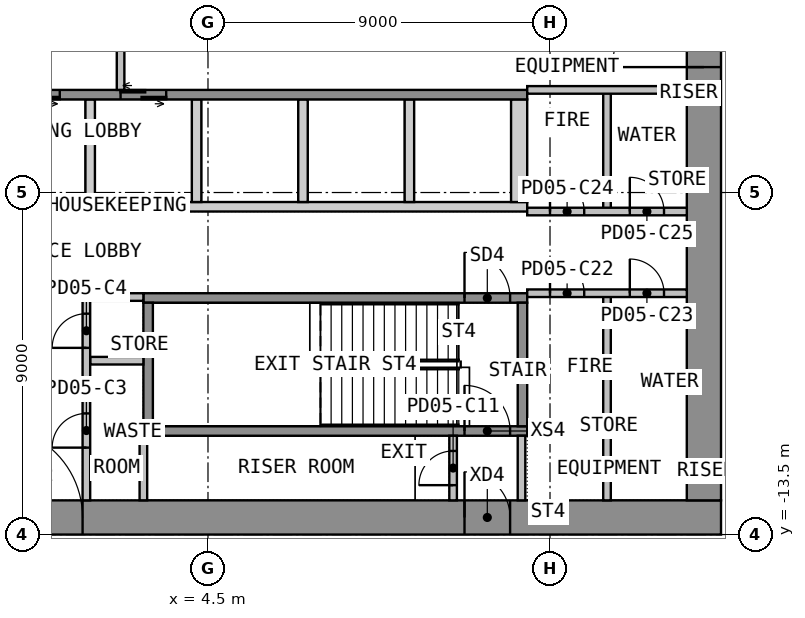
"""IFC4 building model, lengths in metres.
Left out: names, types, materials, properties, quantities, classifications, styles, units other than length and angle.
Written with IfcOpenShell. Run it as: python <this file> out.ifc"""

import sys

from ifc_helpers import new_model, si_unit, direction, frame, frame_2d, origin, place, context, subcontext, project, spatial, polyline, rectangle, outline, extrude, element, fill, save


model = new_model("IFC4")
c1 = context("Model", 3, precision=1e-05, world=origin(), true_north=direction((0.0, 1.0)))
c2 = subcontext(c1, "Body", "Model", "MODEL_VIEW")
j1 = project(units=[si_unit("LENGTHUNIT", "METRE"), si_unit("PLANEANGLEUNIT", "RADIAN")], contexts=[c1])
p1 = place(None, origin())
s1 = spatial("IfcSite", under=j1, at=p1, CompositionType="ELEMENT")
p2 = place(p1, origin())
s2 = spatial("IfcBuilding", under=s1, at=p2, CompositionType="ELEMENT")
p3 = place(p2, frame((0.0, 0.0, 25.2)))
s3 = spatial("IfcBuildingStorey", under=s2, at=p3, CompositionType="ELEMENT", Elevation=25.2)
p4 = place(p3, frame((-18.0, -13.05, 0.0), z_axis=(0.0, 0.0, 1.0), x_axis=(1.0, 0.0, 0.0)))
e1 = element("IfcWall", 1, at=p4, inside=s3, PredefinedType="SHEAR", context=c2, shape_type="SweptSolid", body=[
    extrude(rectangle(XDim=36.0, YDim=0.9, at=frame_2d((18.0, 0.0))), origin(), (0.0, 0.0, 1.0), 4.425),
])
p5 = place(p4, frame((16.8, 0.0, 0.0)))
e2 = element("IfcOpeningElement", 2, at=p5, cuts=e1, PredefinedType="OPENING", context=c2, shape_type="SweptSolid", body=[
    extrude(rectangle(XDim=2.4, YDim=2.1, at=frame_2d((1.2, 1.05))), frame((0.0, 0.46, 0.0), z_axis=(0.0, -1.0, 0.0), x_axis=(1.0, 0.0, 0.0)), (0.0, 0.0, 1.0), 0.92),
])
p6 = place(p4, frame((5.55, 0.0, 0.0)))
e3 = element("IfcOpeningElement", 3, at=p6, cuts=e1, PredefinedType="OPENING", context=c2, shape_type="SweptSolid", body=[
    extrude(rectangle(XDim=1.2, YDim=2.1, at=frame_2d((0.6, 1.05))), frame((0.0, 0.46, 0.0), z_axis=(0.0, -1.0, 0.0), x_axis=(1.0, 0.0, 0.0)), (0.0, 0.0, 1.0), 0.92),
])
p7 = place(p4, frame((29.25, 0.0, 0.0)))
e4 = element("IfcOpeningElement", 4, at=p7, cuts=e1, PredefinedType="OPENING", context=c2, shape_type="SweptSolid", body=[
    extrude(rectangle(XDim=1.2, YDim=2.1, at=frame_2d((0.6, 1.05))), frame((0.0, 0.46, 0.0), z_axis=(0.0, -1.0, 0.0), x_axis=(1.0, 0.0, 0.0)), (0.0, 0.0, 1.0), 0.92),
])
p8 = place(p3, frame((17.55, -12.6, 0.0), z_axis=(0.0, 0.0, 1.0), x_axis=(0.0, 1.0, 0.0)))
e5 = element("IfcWall", 5, at=p8, inside=s3, PredefinedType="SHEAR", context=c2, shape_type="SweptSolid", body=[
    extrude(rectangle(XDim=25.2, YDim=0.9, at=frame_2d((12.6, 0.0))), origin(), (0.0, 0.0, 1.0), 4.425),
])
p9 = place(p8, frame((11.4, 0.0, 0.0)))
e6 = element("IfcOpeningElement", 6, at=p9, cuts=e5, PredefinedType="OPENING", context=c2, shape_type="SweptSolid", body=[
    extrude(rectangle(XDim=2.4, YDim=2.1, at=frame_2d((1.2, 1.05))), frame((0.0, 0.46, 0.0), z_axis=(0.0, -1.0, 0.0), x_axis=(1.0, 0.0, 0.0)), (0.0, 0.0, 1.0), 0.92),
])
p10 = place(p3, origin())
e7 = element("IfcWall", 7, at=p10, inside=s3, PredefinedType="SHEAR", context=c2, shape_type="SweptSolid", body=[
    extrude(outline(polyline([(-12.9, -5.0), (12.9, -5.0), (12.9, -4.75), (-12.9, -4.75), (-12.9, -5.0)])), origin(), (0.0, 0.0, 1.0), 4.425),
])
p11 = place(p3, origin())
e8 = element("IfcWall", 8, at=p11, inside=s3, PredefinedType="SHEAR", context=c2, shape_type="SweptSolid", body=[
    extrude(outline(polyline([(1.275, -4.75), (1.525, -4.75), (1.525, -2.05), (1.275, -2.05), (1.275, -4.75)])), origin(), (0.0, 0.0, 1.0), 4.425),
])
p12 = place(p3, origin())
e9 = element("IfcWall", 9, at=p12, inside=s3, PredefinedType="SHEAR", context=c2, shape_type="SweptSolid", body=[
    extrude(outline(polyline([(4.075, -4.75), (4.325, -4.75), (4.325, -2.05), (4.075, -2.05), (4.075, -4.75)])), origin(), (0.0, 0.0, 1.0), 4.425),
])
p13 = place(p3, origin())
e10 = element("IfcWall", 10, at=p13, inside=s3, PredefinedType="SHEAR", context=c2, shape_type="SweptSolid", body=[
    extrude(outline(polyline([(6.875, -4.75), (7.125, -4.75), (7.125, -2.05), (6.875, -2.05), (6.875, -4.75)])), origin(), (0.0, 0.0, 1.0), 4.425),
])
p14 = place(p3, origin())
e11 = element("IfcWall", 11, at=p14, inside=s3, PredefinedType="SHEAR", context=c2, shape_type="SweptSolid", body=[
    extrude(outline(polyline([(9.675, -4.75), (9.925, -4.75), (9.925, -2.05), (9.675, -2.05), (9.675, -4.75)])), origin(), (0.0, 0.0, 1.0), 4.425),
])
p15 = place(p3, origin())
e12 = element("IfcWall", 12, at=p15, inside=s3, PredefinedType="SHEAR", context=c2, shape_type="SweptSolid", body=[
    extrude(outline(polyline([(12.475, -4.75), (12.9, -4.75), (12.9, -2.05), (12.475, -2.05), (12.475, -4.75)])), origin(), (0.0, 0.0, 1.0), 4.425),
])
p16 = place(p3, frame((-12.9, -1.925, 0.0), z_axis=(0.0, 0.0, 1.0), x_axis=(1.0, 0.0, 0.0)))
e13 = element("IfcWall", 13, at=p16, inside=s3, PredefinedType="SHEAR", context=c2, shape_type="SweptSolid", body=[
    extrude(rectangle(XDim=25.8, YDim=0.25, at=frame_2d((12.9, 0.0))), origin(), (0.0, 0.0, 1.0), 4.425),
])
p17 = place(p16, frame((1.1, 0.0, 0.0)))
e14 = element("IfcOpeningElement", 14, at=p17, cuts=e13, PredefinedType="OPENING", context=c2, shape_type="SweptSolid", body=[
    extrude(rectangle(XDim=1.2, YDim=2.1, at=frame_2d((0.6, 1.05))), frame((0.0, 0.135, 0.0), z_axis=(0.0, -1.0, 0.0), x_axis=(1.0, 0.0, 0.0)), (0.0, 0.0, 1.0), 0.27),
])
p18 = place(p16, frame((3.9, 0.0, 0.0)))
e15 = element("IfcOpeningElement", 15, at=p18, cuts=e13, PredefinedType="OPENING", context=c2, shape_type="SweptSolid", body=[
    extrude(rectangle(XDim=1.2, YDim=2.1, at=frame_2d((0.6, 1.05))), frame((0.0, 0.135, 0.0), z_axis=(0.0, -1.0, 0.0), x_axis=(1.0, 0.0, 0.0)), (0.0, 0.0, 1.0), 0.27),
])
p19 = place(p16, frame((6.7, 0.0, 0.0)))
e16 = element("IfcOpeningElement", 16, at=p19, cuts=e13, PredefinedType="OPENING", context=c2, shape_type="SweptSolid", body=[
    extrude(rectangle(XDim=1.2, YDim=2.1, at=frame_2d((0.6, 1.05))), frame((0.0, 0.135, 0.0), z_axis=(0.0, -1.0, 0.0), x_axis=(1.0, 0.0, 0.0)), (0.0, 0.0, 1.0), 0.27),
])
p20 = place(p16, frame((9.5, 0.0, 0.0)))
e17 = element("IfcOpeningElement", 17, at=p20, cuts=e13, PredefinedType="OPENING", context=c2, shape_type="SweptSolid", body=[
    extrude(rectangle(XDim=1.2, YDim=2.1, at=frame_2d((0.6, 1.05))), frame((0.0, 0.135, 0.0), z_axis=(0.0, -1.0, 0.0), x_axis=(1.0, 0.0, 0.0)), (0.0, 0.0, 1.0), 0.27),
])
p21 = place(p16, frame((12.3, 0.0, 0.0)))
e18 = element("IfcOpeningElement", 18, at=p21, cuts=e13, PredefinedType="OPENING", context=c2, shape_type="SweptSolid", body=[
    extrude(rectangle(XDim=1.2, YDim=2.1, at=frame_2d((0.6, 1.05))), frame((0.0, 0.135, 0.0), z_axis=(0.0, -1.0, 0.0), x_axis=(1.0, 0.0, 0.0)), (0.0, 0.0, 1.0), 0.27),
])
p22 = place(p16, frame((15.1, 0.0, 0.0)))
e19 = element("IfcOpeningElement", 19, at=p22, cuts=e13, PredefinedType="OPENING", context=c2, shape_type="SweptSolid", body=[
    extrude(rectangle(XDim=1.2, YDim=2.1, at=frame_2d((0.6, 1.05))), frame((0.0, 0.135, 0.0), z_axis=(0.0, -1.0, 0.0), x_axis=(1.0, 0.0, 0.0)), (0.0, 0.0, 1.0), 0.27),
])
p23 = place(p3, frame((2.2, -1.8, 0.0), z_axis=(0.0, 0.0, 1.0), x_axis=(0.0, 1.0, 0.0)))
e20 = element("IfcWall", 20, at=p23, inside=s3, PredefinedType="PARTITIONING", context=c2, shape_type="SweptSolid", body=[
    extrude(rectangle(XDim=3.6, YDim=0.2, at=frame_2d((1.8, 0.0))), origin(), (0.0, 0.0, 1.0), 4.425),
])
p24 = place(p23, frame((1.2, 0.0, 0.0)))
e21 = element("IfcOpeningElement", 21, at=p24, cuts=e20, PredefinedType="OPENING", context=c2, shape_type="SweptSolid", body=[
    extrude(rectangle(XDim=1.2, YDim=2.1, at=frame_2d((0.6, 1.05))), frame((0.0, 0.11, 0.0), z_axis=(0.0, -1.0, 0.0), x_axis=(1.0, 0.0, 0.0)), (0.0, 0.0, 1.0), 0.22),
])
p25 = place(p3, frame((2.8, -10.775, 0.0), z_axis=(0.0, 0.0, 1.0), x_axis=(1.0, 0.0, 0.0)))
e22 = element("IfcWall", 22, at=p25, inside=s3, PredefinedType="SHEAR", context=c2, shape_type="SweptSolid", body=[
    extrude(rectangle(XDim=10.1, YDim=0.25, at=frame_2d((5.05, 0.0))), origin(), (0.0, 0.0, 1.0), 4.425),
])
p26 = place(p25, frame((8.45, 0.0, 0.0)))
e23 = element("IfcOpeningElement", 23, at=p26, cuts=e22, PredefinedType="OPENING", context=c2, shape_type="SweptSolid", body=[
    extrude(rectangle(XDim=1.2, YDim=2.1, at=frame_2d((0.6, 1.05))), frame((0.0, 0.135, 0.0), z_axis=(0.0, -1.0, 0.0), x_axis=(1.0, 0.0, 0.0)), (0.0, 0.0, 1.0), 0.27),
])
p27 = place(p3, frame((2.8, -7.275, 0.0), z_axis=(0.0, 0.0, 1.0), x_axis=(1.0, 0.0, 0.0)))
e24 = element("IfcWall", 24, at=p27, inside=s3, PredefinedType="SHEAR", context=c2, shape_type="SweptSolid", body=[
    extrude(rectangle(XDim=10.1, YDim=0.25, at=frame_2d((5.05, 0.0))), origin(), (0.0, 0.0, 1.0), 4.425),
])
p28 = place(p27, frame((8.45, 0.0, 0.0)))
e25 = element("IfcOpeningElement", 25, at=p28, cuts=e24, PredefinedType="OPENING", context=c2, shape_type="SweptSolid", body=[
    extrude(rectangle(XDim=1.2, YDim=2.1, at=frame_2d((0.6, 1.05))), frame((0.0, 0.135, 0.0), z_axis=(0.0, -1.0, 0.0), x_axis=(1.0, 0.0, 0.0)), (0.0, 0.0, 1.0), 0.27),
])
for number, where, z_axis, x_axis in (
    (26, (2.925, -10.65, 0.0), (0.0, 0.0, 1.0), (0.0, 1.0, 0.0)),
    (27, (12.775, -10.65, 0.0), (0.0, 0.0, 1.0), (0.0, 1.0, 0.0)),
):
    element("IfcWall", number, at=place(p3, frame(where, z_axis=z_axis, x_axis=x_axis)), inside=s3, PredefinedType="SHEAR", context=c2, shape_type="SweptSolid", body=[
        extrude(rectangle(XDim=3.25, YDim=0.25, at=frame_2d((1.625, 0.0))), origin(), (0.0, 0.0, 1.0), 4.425),
    ])
for number, where, z_axis, x_axis in (
    (28, (1.4, -7.25, 0.0), (0.0, 0.0, 1.0), (1.0, 0.0, 0.0)),
    (29, (1.4, -8.925, 0.0), (0.0, 0.0, 1.0), (1.0, 0.0, 0.0)),
):
    element("IfcWall", number, at=place(p3, frame(where, z_axis=z_axis, x_axis=x_axis)), inside=s3, PredefinedType="PARTITIONING", context=c2, shape_type="SweptSolid", body=[
        extrude(rectangle(XDim=1.4, YDim=0.2, at=frame_2d((0.7, 0.0))), origin(), (0.0, 0.0, 1.0), 4.425),
    ])
p29 = place(p3, frame((1.3, -12.6, 0.0), z_axis=(0.0, 0.0, 1.0), x_axis=(0.0, 1.0, 0.0)))
e30 = element("IfcWall", 30, at=p29, inside=s3, PredefinedType="PARTITIONING", context=c2, shape_type="SweptSolid", body=[
    extrude(rectangle(XDim=5.45, YDim=0.2, at=frame_2d((2.725, 0.0))), origin(), (0.0, 0.0, 1.0), 4.425),
])
p30 = place(p29, frame((1.387, 0.0, 0.0)))
e31 = element("IfcOpeningElement", 31, at=p30, cuts=e30, PredefinedType="OPENING", context=c2, shape_type="SweptSolid", body=[
    extrude(rectangle(XDim=0.9, YDim=2.1, at=frame_2d((0.45, 1.05))), frame((0.0, 0.11, 0.0), z_axis=(0.0, -1.0, 0.0), x_axis=(1.0, 0.0, 0.0)), (0.0, 0.0, 1.0), 0.22),
])
p31 = place(p29, frame((4.012, 0.0, 0.0)))
e32 = element("IfcOpeningElement", 32, at=p31, cuts=e30, PredefinedType="OPENING", context=c2, shape_type="SweptSolid", body=[
    extrude(rectangle(XDim=0.9, YDim=2.1, at=frame_2d((0.45, 1.05))), frame((0.0, 0.11, 0.0), z_axis=(0.0, -1.0, 0.0), x_axis=(1.0, 0.0, 0.0)), (0.0, 0.0, 1.0), 0.22),
])
p32 = place(p3, frame((12.75, -12.6, 0.0), z_axis=(0.0, 0.0, 1.0), x_axis=(0.0, 1.0, 0.0)))
e33 = element("IfcWall", 33, at=p32, inside=s3, PredefinedType="PARTITIONING", context=c2, shape_type="SweptSolid", body=[
    extrude(rectangle(XDim=1.7, YDim=0.2, at=frame_2d((0.85, 0.0))), origin(), (0.0, 0.0, 1.0), 4.425),
])
p33 = place(p3, frame((10.95, -12.6, 0.0), z_axis=(0.0, 0.0, 1.0), x_axis=(0.0, 1.0, 0.0)))
e34 = element("IfcWall", 34, at=p33, inside=s3, PredefinedType="PARTITIONING", context=c2, shape_type="SweptSolid", body=[
    extrude(rectangle(XDim=1.7, YDim=0.2, at=frame_2d((0.85, 0.0))), origin(), (0.0, 0.0, 1.0), 4.425),
])
p34 = place(p33, frame((0.4, 0.0, 0.0)))
e35 = element("IfcOpeningElement", 35, at=p34, cuts=e34, PredefinedType="OPENING", context=c2, shape_type="SweptSolid", body=[
    extrude(rectangle(XDim=0.9, YDim=2.1, at=frame_2d((0.45, 1.05))), frame((0.0, 0.11, 0.0), z_axis=(0.0, -1.0, 0.0), x_axis=(1.0, 0.0, 0.0)), (0.0, 0.0, 1.0), 0.22),
])
p35 = place(p3, frame((15.0, -12.6, 0.0), z_axis=(0.0, 0.0, 1.0), x_axis=(0.0, 1.0, 0.0)))
e36 = element("IfcWall", 36, at=p35, inside=s3, PredefinedType="PARTITIONING", context=c2, shape_type="SweptSolid", body=[
    extrude(rectangle(XDim=5.45, YDim=0.2, at=frame_2d((2.725, 0.0))), origin(), (0.0, 0.0, 1.0), 4.425),
])
p36 = place(p3, frame((12.9, -7.15, 0.0), z_axis=(0.0, 0.0, 1.0), x_axis=(1.0, 0.0, 0.0)))
e37 = element("IfcWall", 37, at=p36, inside=s3, PredefinedType="PARTITIONING", context=c2, shape_type="SweptSolid", body=[
    extrude(rectangle(XDim=4.2, YDim=0.2, at=frame_2d((2.1, 0.0))), origin(), (0.0, 0.0, 1.0), 4.425),
])
p37 = place(p36, frame((0.6, 0.0, 0.0)))
e38 = element("IfcOpeningElement", 38, at=p37, cuts=e37, PredefinedType="OPENING", context=c2, shape_type="SweptSolid", body=[
    extrude(rectangle(XDim=0.9, YDim=2.1, at=frame_2d((0.45, 1.05))), frame((0.0, 0.11, 0.0), z_axis=(0.0, -1.0, 0.0), x_axis=(1.0, 0.0, 0.0)), (0.0, 0.0, 1.0), 0.22),
])
p38 = place(p36, frame((2.7, 0.0, 0.0)))
e39 = element("IfcOpeningElement", 39, at=p38, cuts=e37, PredefinedType="OPENING", context=c2, shape_type="SweptSolid", body=[
    extrude(rectangle(XDim=0.9, YDim=2.1, at=frame_2d((0.45, 1.05))), frame((0.0, 0.11, 0.0), z_axis=(0.0, -1.0, 0.0), x_axis=(1.0, 0.0, 0.0)), (0.0, 0.0, 1.0), 0.22),
])
p39 = place(p3, frame((15.0, -5.0, 0.0), z_axis=(0.0, 0.0, 1.0), x_axis=(0.0, 1.0, 0.0)))
e40 = element("IfcWall", 40, at=p39, inside=s3, PredefinedType="PARTITIONING", context=c2, shape_type="SweptSolid", body=[
    extrude(rectangle(XDim=3.2, YDim=0.2, at=frame_2d((1.6, 0.0))), origin(), (0.0, 0.0, 1.0), 4.425),
])
p40 = place(p3, frame((12.9, -5.0, 0.0), z_axis=(0.0, 0.0, 1.0), x_axis=(1.0, 0.0, 0.0)))
e41 = element("IfcWall", 41, at=p40, inside=s3, PredefinedType="PARTITIONING", context=c2, shape_type="SweptSolid", body=[
    extrude(rectangle(XDim=4.2, YDim=0.2, at=frame_2d((2.1, 0.0))), origin(), (0.0, 0.0, 1.0), 4.425),
])
p41 = place(p40, frame((0.6, 0.0, 0.0)))
e42 = element("IfcOpeningElement", 42, at=p41, cuts=e41, PredefinedType="OPENING", context=c2, shape_type="SweptSolid", body=[
    extrude(rectangle(XDim=0.9, YDim=2.1, at=frame_2d((0.45, 1.05))), frame((0.0, 0.11, 0.0), z_axis=(0.0, -1.0, 0.0), x_axis=(1.0, 0.0, 0.0)), (0.0, 0.0, 1.0), 0.22),
])
p42 = place(p40, frame((2.7, 0.0, 0.0)))
e43 = element("IfcOpeningElement", 43, at=p42, cuts=e41, PredefinedType="OPENING", context=c2, shape_type="SweptSolid", body=[
    extrude(rectangle(XDim=0.9, YDim=2.1, at=frame_2d((0.45, 1.05))), frame((0.0, 0.11, 0.0), z_axis=(0.0, -1.0, 0.0), x_axis=(1.0, 0.0, 0.0)), (0.0, 0.0, 1.0), 0.22),
])
p43 = place(p3, frame((12.9, -1.8, 0.0), z_axis=(0.0, 0.0, 1.0), x_axis=(1.0, 0.0, 0.0)))
e44 = element("IfcWall", 44, at=p43, inside=s3, PredefinedType="PARTITIONING", context=c2, shape_type="SweptSolid", body=[
    extrude(rectangle(XDim=4.2, YDim=0.2, at=frame_2d((2.1, 0.0))), origin(), (0.0, 0.0, 1.0), 4.425),
])
p44 = place(p3, frame((2.8, -10.901, 0.0), z_axis=(0.0, 0.0, 1.0), x_axis=(0.0, -1.0, 0.0)))
e45 = element("IfcWall", 45, at=p44, inside=s3, PredefinedType="PARTITIONING", context=c2, shape_type="SweptSolid", body=[
    extrude(rectangle(XDim=1.698, YDim=0.2, at=frame_2d((0.849, 0.0))), origin(), (0.0, 0.0, 1.0), 4.425),
])
p45 = place(p9, origin())
e46 = element("IfcDoor", 46, at=p45, inside=s3, OperationType="DOUBLE_DOOR_DOUBLE_SWING", PredefinedType="DOOR", context=c2, shape_type="SweptSolid", body=[
    extrude(rectangle(XDim=2.4, YDim=2.1, at=frame_2d((1.2, 1.05))), frame((0.0, 0.025, 0.0), z_axis=(0.0, -1.0, 0.0), x_axis=(1.0, 0.0, 0.0)), (0.0, 0.0, 1.0), 0.05),
])
fill(e6, e46)
p46 = place(p5, origin())
e47 = element("IfcDoor", 47, at=p46, inside=s3, OperationType="DOUBLE_DOOR_DOUBLE_SWING", PredefinedType="DOOR", context=c2, shape_type="SweptSolid", body=[
    extrude(rectangle(XDim=2.4, YDim=2.1, at=frame_2d((1.2, 1.05))), frame((0.0, 0.025, 0.0), z_axis=(0.0, -1.0, 0.0), x_axis=(1.0, 0.0, 0.0)), (0.0, 0.0, 1.0), 0.05),
])
fill(e2, e47)
p47 = place(p7, origin())
e48 = element("IfcDoor", 48, at=p47, inside=s3, OperationType="SINGLE_SWING_RIGHT", PredefinedType="DOOR", context=c2, shape_type="SweptSolid", body=[
    extrude(rectangle(XDim=1.2, YDim=2.1, at=frame_2d((0.6, 1.05))), frame((0.0, 0.025, 0.0), z_axis=(0.0, -1.0, 0.0), x_axis=(1.0, 0.0, 0.0)), (0.0, 0.0, 1.0), 0.05),
])
fill(e4, e48)
p48 = place(p21, origin())
e49 = element("IfcDoor", 49, at=p48, inside=s3, OperationType="DOUBLE_DOOR_SLIDING", PredefinedType="DOOR", context=c2, shape_type="SweptSolid", body=[
    extrude(rectangle(XDim=1.2, YDim=2.1, at=frame_2d((0.6, 1.05))), frame((0.0, 0.025, 0.0), z_axis=(0.0, -1.0, 0.0), x_axis=(1.0, 0.0, 0.0)), (0.0, 0.0, 1.0), 0.05),
])
fill(e18, e49)
p49 = place(p22, origin())
e50 = element("IfcDoor", 50, at=p49, inside=s3, OperationType="DOUBLE_DOOR_SLIDING", PredefinedType="DOOR", context=c2, shape_type="SweptSolid", body=[
    extrude(rectangle(XDim=1.2, YDim=2.1, at=frame_2d((0.6, 1.05))), frame((0.0, 0.025, 0.0), z_axis=(0.0, -1.0, 0.0), x_axis=(1.0, 0.0, 0.0)), (0.0, 0.0, 1.0), 0.05),
])
fill(e19, e50)
p50 = place(p28, origin())
e51 = element("IfcDoor", 51, at=p50, inside=s3, OperationType="SINGLE_SWING_LEFT", PredefinedType="DOOR", context=c2, shape_type="SweptSolid", body=[
    extrude(rectangle(XDim=1.2, YDim=2.1, at=frame_2d((0.6, 1.05))), frame((0.0, 0.025, 0.0), z_axis=(0.0, -1.0, 0.0), x_axis=(1.0, 0.0, 0.0)), (0.0, 0.0, 1.0), 0.05),
])
fill(e25, e51)
p51 = place(p30, origin())
e52 = element("IfcDoor", 52, at=p51, inside=s3, OperationType="SINGLE_SWING_LEFT", PredefinedType="DOOR", context=c2, shape_type="SweptSolid", body=[
    extrude(rectangle(XDim=0.9, YDim=2.1, at=frame_2d((0.45, 1.05))), frame((0.0, 0.025, 0.0), z_axis=(0.0, -1.0, 0.0), x_axis=(1.0, 0.0, 0.0)), (0.0, 0.0, 1.0), 0.05),
])
fill(e31, e52)
p52 = place(p31, origin())
e53 = element("IfcDoor", 53, at=p52, inside=s3, OperationType="SINGLE_SWING_LEFT", PredefinedType="DOOR", context=c2, shape_type="SweptSolid", body=[
    extrude(rectangle(XDim=0.9, YDim=2.1, at=frame_2d((0.45, 1.05))), frame((0.0, 0.025, 0.0), z_axis=(0.0, -1.0, 0.0), x_axis=(1.0, 0.0, 0.0)), (0.0, 0.0, 1.0), 0.05),
])
fill(e32, e53)
p53 = place(p26, origin())
e54 = element("IfcDoor", 54, at=p53, inside=s3, OperationType="SINGLE_SWING_RIGHT", PredefinedType="DOOR", context=c2, shape_type="SweptSolid", body=[
    extrude(rectangle(XDim=1.2, YDim=2.1, at=frame_2d((0.6, 1.05))), frame((0.0, 0.025, 0.0), z_axis=(0.0, -1.0, 0.0), x_axis=(1.0, 0.0, 0.0)), (0.0, 0.0, 1.0), 0.05),
])
fill(e23, e54)
p54 = place(p34, origin())
e55 = element("IfcDoor", 55, at=p54, inside=s3, OperationType="SINGLE_SWING_LEFT", PredefinedType="DOOR", context=c2, shape_type="SweptSolid", body=[
    extrude(rectangle(XDim=0.9, YDim=2.1, at=frame_2d((0.45, 1.05))), frame((0.0, 0.025, 0.0), z_axis=(0.0, -1.0, 0.0), x_axis=(1.0, 0.0, 0.0)), (0.0, 0.0, 1.0), 0.05),
])
fill(e35, e55)
p55 = place(p37, origin())
e56 = element("IfcDoor", 56, at=p55, inside=s3, OperationType="SINGLE_SWING_LEFT", PredefinedType="DOOR", context=c2, shape_type="SweptSolid", body=[
    extrude(rectangle(XDim=0.9, YDim=2.1, at=frame_2d((0.45, 1.05))), frame((0.0, 0.025, 0.0), z_axis=(0.0, -1.0, 0.0), x_axis=(1.0, 0.0, 0.0)), (0.0, 0.0, 1.0), 0.05),
])
fill(e38, e56)
p56 = place(p38, origin())
e57 = element("IfcDoor", 57, at=p56, inside=s3, OperationType="SINGLE_SWING_LEFT", PredefinedType="DOOR", context=c2, shape_type="SweptSolid", body=[
    extrude(rectangle(XDim=0.9, YDim=2.1, at=frame_2d((0.45, 1.05))), frame((0.0, 0.025, 0.0), z_axis=(0.0, -1.0, 0.0), x_axis=(1.0, 0.0, 0.0)), (0.0, 0.0, 1.0), 0.05),
])
fill(e39, e57)
p57 = place(p41, origin())
e58 = element("IfcDoor", 58, at=p57, inside=s3, OperationType="SINGLE_SWING_LEFT", PredefinedType="DOOR", context=c2, shape_type="SweptSolid", body=[
    extrude(rectangle(XDim=0.9, YDim=2.1, at=frame_2d((0.45, 1.05))), frame((0.0, 0.025, 0.0), z_axis=(0.0, -1.0, 0.0), x_axis=(1.0, 0.0, 0.0)), (0.0, 0.0, 1.0), 0.05),
])
fill(e42, e58)
p58 = place(p42, origin())
e59 = element("IfcDoor", 59, at=p58, inside=s3, OperationType="SINGLE_SWING_LEFT", PredefinedType="DOOR", context=c2, shape_type="SweptSolid", body=[
    extrude(rectangle(XDim=0.9, YDim=2.1, at=frame_2d((0.45, 1.05))), frame((0.0, 0.025, 0.0), z_axis=(0.0, -1.0, 0.0), x_axis=(1.0, 0.0, 0.0)), (0.0, 0.0, 1.0), 0.05),
])
fill(e43, e59)
save(model, sys.argv[1])
